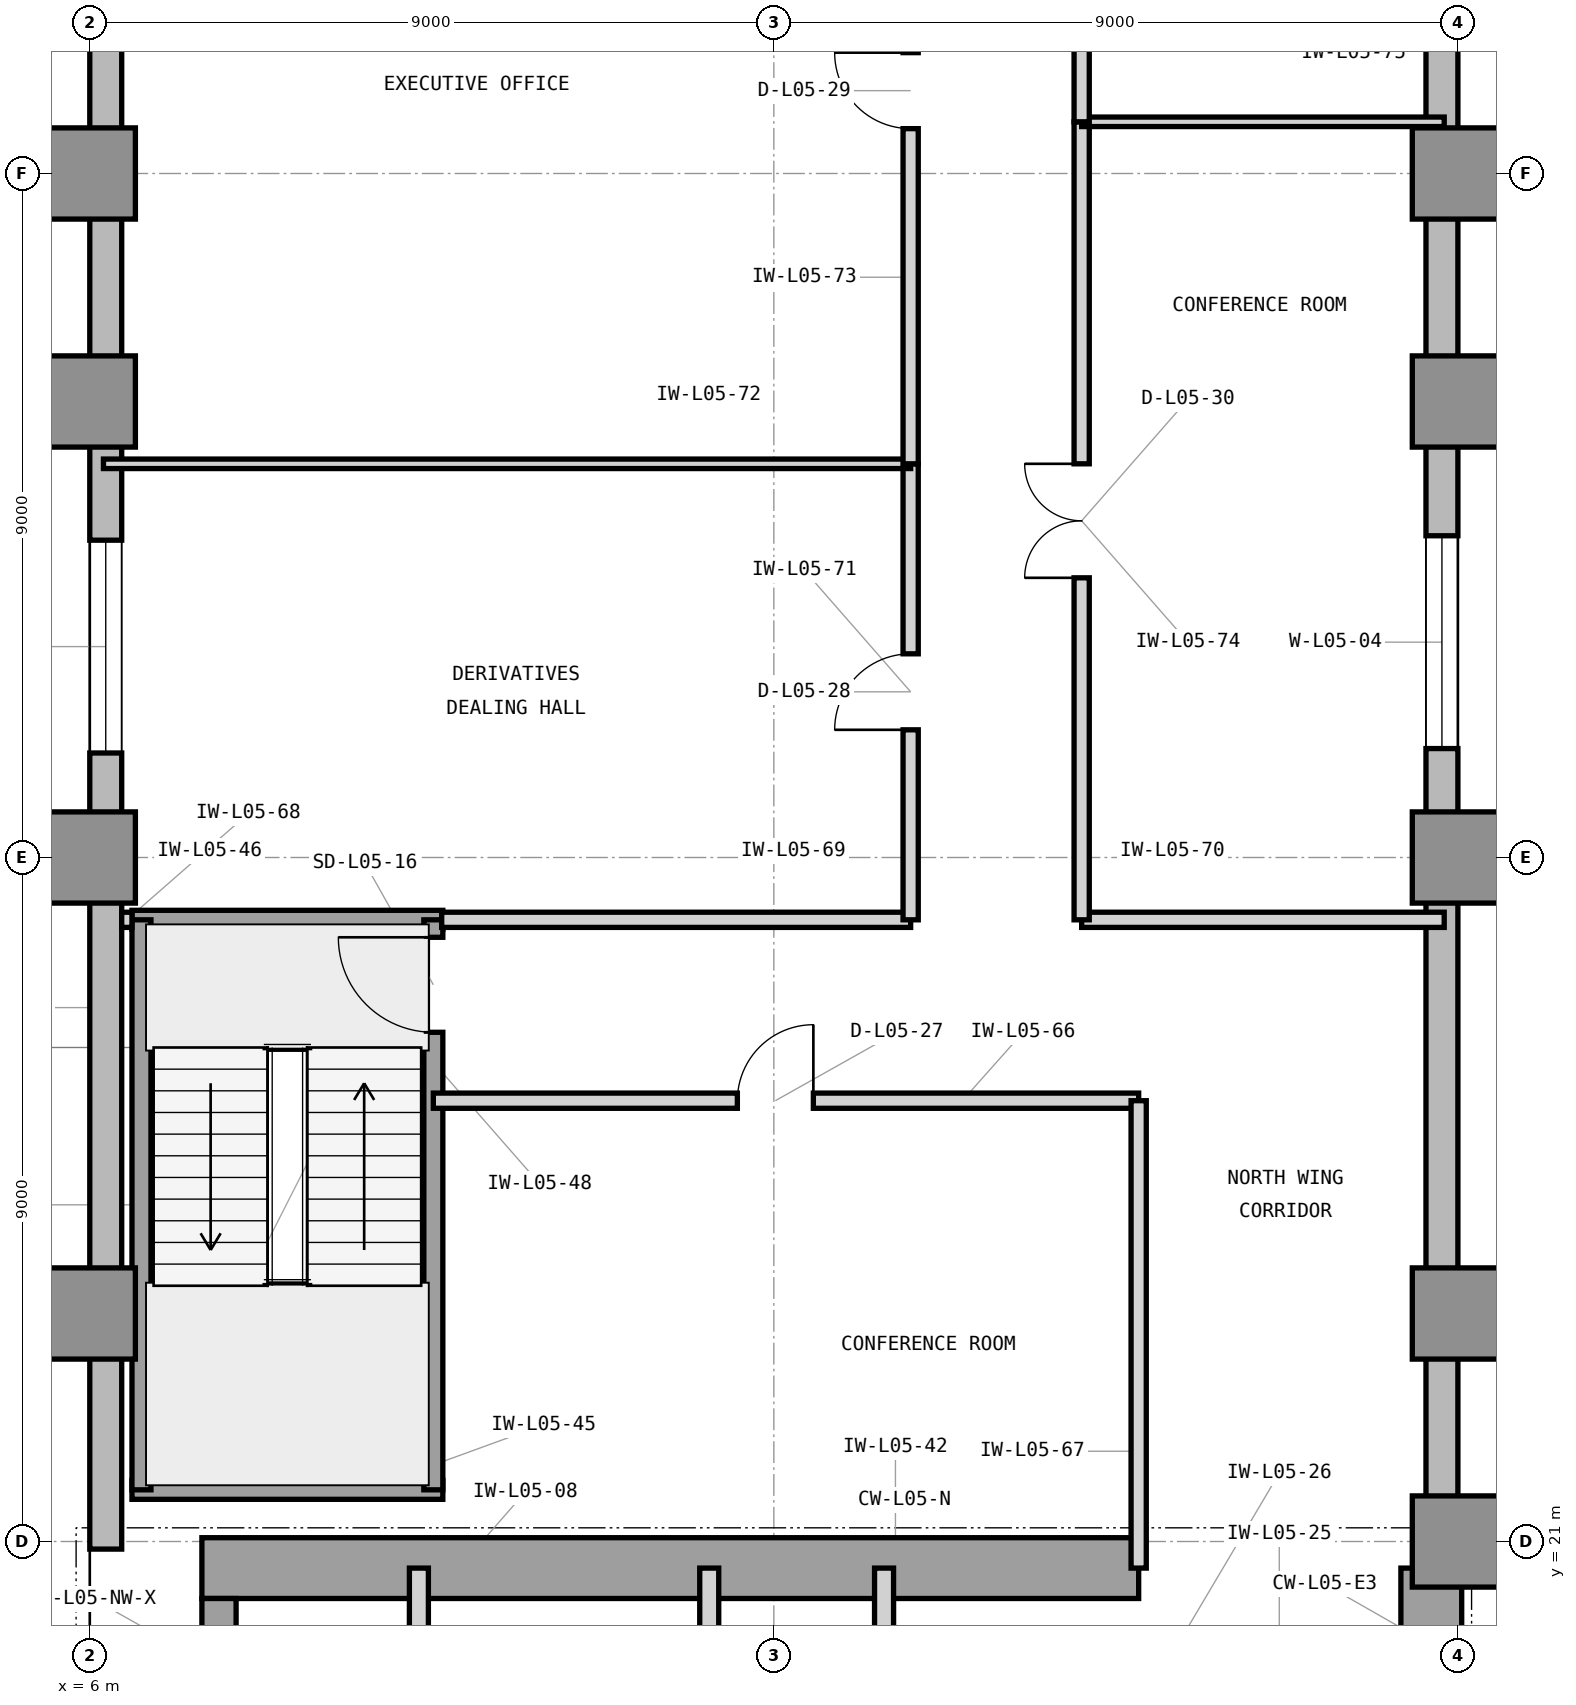
"""IFC4 building model, lengths in metres.
Left out: names, types, materials, properties, quantities, classifications, styles, units other than length and angle.
Written with IfcOpenShell. Run it as: python <this file> out.ifc"""

import sys

from ifc_helpers import new_model, si_unit, direction, frame, frame_2d, origin, origin_2d, place, context, subcontext, project, spatial, rectangle, extrude, element, fill, save


model = new_model("IFC4")
c1 = context("Model", 3, precision=1e-05, world=origin(), true_north=direction((0.0, 1.0)))
c2 = subcontext(c1, "Body", "Model", "MODEL_VIEW")
j1 = project(units=[si_unit("LENGTHUNIT", "METRE"), si_unit("PLANEANGLEUNIT", "RADIAN")], contexts=[c1])
p1 = place(None, origin())
s1 = spatial("IfcSite", under=j1, at=p1, CompositionType="ELEMENT")
p2 = place(p1, origin())
s2 = spatial("IfcBuilding", under=s1, at=p2, CompositionType="ELEMENT")
p3 = place(p2, frame((0.0, 0.0, 25.8)))
s3 = spatial("IfcBuildingStorey", under=s2, at=p3, CompositionType="ELEMENT", Elevation=25.8)
p4 = place(p3, frame((7.475, 20.65, 0.0), z_axis=(0.0, 0.0, 1.0), x_axis=(1.0, 0.0, 0.0)))
e1 = element("IfcWall", 1, at=p4, inside=s3, PredefinedType="SHEAR", context=c2, shape_type="SweptSolid", body=[
    extrude(rectangle(XDim=12.325, YDim=0.8, at=frame_2d((6.163, 0.0))), origin(), (0.0, 0.0, 1.0), 4.2),
])
p5 = place(p3, frame((23.65, 16.6, 0.0), z_axis=(0.0, 0.0, 1.0), x_axis=(0.0, 1.0, 0.0)))
e2 = element("IfcWall", 2, at=p5, inside=s3, PredefinedType="SHEAR", context=c2, shape_type="SweptSolid", body=[
    extrude(rectangle(XDim=4.05, YDim=0.8, at=frame_2d((2.025, 0.0))), origin(), (0.0, 0.0, 1.0), 4.2),
])
p6 = place(p3, frame((7.7, 19.575, 0.0), z_axis=(0.0, 0.0, 1.0), x_axis=(0.0, 1.0, 0.0)))
e3 = element("IfcWall", 3, at=p6, inside=s3, PredefinedType="SHEAR", context=c2, shape_type="SweptSolid", body=[
    extrude(rectangle(XDim=0.675, YDim=0.45, at=frame_2d((0.337, 0.0))), origin(), (0.0, 0.0, 1.0), 4.2),
])
for number, where, z_axis, x_axis in (
    (4, (24.0, 21.0, 0.0), (0.0, 0.0, 1.0), (1.0, 0.0, 0.0)),
    (5, (6.0, 24.0, 0.0), (0.0, 0.0, 1.0), (1.0, 0.0, 0.0)),
    (6, (24.0, 24.0, 0.0), (0.0, 0.0, 1.0), (1.0, 0.0, 0.0)),
    (7, (6.0, 30.0, 0.0), (0.0, 0.0, 1.0), (1.0, 0.0, 0.0)),
    (8, (24.0, 30.0, 0.0), (0.0, 0.0, 1.0), (1.0, 0.0, 0.0)),
    (9, (6.0, 36.0, 0.0), (0.0, 0.0, 1.0), (1.0, 0.0, 0.0)),
    (10, (24.0, 36.0, 0.0), (0.0, 0.0, 1.0), (1.0, 0.0, 0.0)),
    (11, (6.0, 39.0, 0.0), (0.0, 0.0, 1.0), (1.0, 0.0, 0.0)),
    (12, (24.0, 39.0, 0.0), (0.0, 0.0, 1.0), (1.0, 0.0, 0.0)),
):
    element("IfcColumn", number, at=place(p3, frame(where, z_axis=z_axis, x_axis=x_axis)), inside=s3, PredefinedType="COLUMN", context=c2, shape_type="SweptSolid", body=[
        extrude(rectangle(XDim=1.2, YDim=1.2, at=origin_2d()), origin(), (0.0, 0.0, 1.0), 4.2),
    ])
p7 = place(p3, frame((23.79, 21.0, 0.0), z_axis=(0.0, 0.0, 1.0), x_axis=(0.0, 1.0, 0.0)))
e13 = element("IfcWall", 13, at=p7, inside=s3, PredefinedType="STANDARD", context=c2, shape_type="SweptSolid", body=[
    extrude(rectangle(XDim=28.4, YDim=0.42, at=frame_2d((14.2, 0.0))), origin(), (0.0, 0.0, 1.0), 3.98),
])
p8 = place(p7, frame((10.433, 0.0, 0.85)))
e14 = element("IfcOpeningElement", 14, at=p8, cuts=e13, PredefinedType="OPENING", context=c2, shape_type="SweptSolid", body=[
    extrude(rectangle(XDim=2.8, YDim=2.45, at=frame_2d((1.4, 1.225))), frame((0.0, 0.22, 0.0), z_axis=(0.0, -1.0, 0.0), x_axis=(1.0, 0.0, 0.0)), (0.0, 0.0, 1.0), 0.44),
])
p9 = place(p7, frame((21.966, 0.0, 0.85)))
e15 = element("IfcOpeningElement", 15, at=p9, cuts=e13, PredefinedType="OPENING", context=c2, shape_type="SweptSolid", body=[
    extrude(rectangle(XDim=1.2, YDim=2.45, at=frame_2d((0.6, 1.225))), frame((0.0, 0.22, 0.0), z_axis=(0.0, -1.0, 0.0), x_axis=(1.0, 0.0, 0.0)), (0.0, 0.0, 1.0), 0.44),
])
p10 = place(p3, frame((6.21, 49.4, 0.0), z_axis=(0.0, 0.0, 1.0), x_axis=(0.0, -1.0, 0.0)))
e16 = element("IfcWall", 16, at=p10, inside=s3, PredefinedType="STANDARD", context=c2, shape_type="SweptSolid", body=[
    extrude(rectangle(XDim=28.5, YDim=0.42, at=frame_2d((14.25, 0.0))), origin(), (0.0, 0.0, 1.0), 3.98),
])
p11 = place(p10, frame((15.225, 0.0, 0.85)))
e17 = element("IfcOpeningElement", 17, at=p11, cuts=e16, PredefinedType="OPENING", context=c2, shape_type="SweptSolid", body=[
    extrude(rectangle(XDim=2.8, YDim=2.45, at=frame_2d((1.4, 1.225))), frame((0.0, 0.22, 0.0), z_axis=(0.0, -1.0, 0.0), x_axis=(1.0, 0.0, 0.0)), (0.0, 0.0, 1.0), 0.44),
])
p12 = place(p10, frame((5.236, 0.0, 0.85)))
e18 = element("IfcOpeningElement", 18, at=p12, cuts=e16, PredefinedType="OPENING", context=c2, shape_type="SweptSolid", body=[
    extrude(rectangle(XDim=1.2, YDim=2.45, at=frame_2d((0.6, 1.225))), frame((0.0, 0.22, 0.0), z_axis=(0.0, -1.0, 0.0), x_axis=(1.0, 0.0, 0.0)), (0.0, 0.0, 1.0), 0.44),
])
p13 = place(p3, frame((10.33, 19.45, 0.0), z_axis=(0.0, 0.0, 1.0), x_axis=(0.0, 1.0, 0.0)))
e19 = element("IfcWall", 19, at=p13, inside=s3, PredefinedType="PARTITIONING", context=c2, shape_type="SweptSolid", body=[
    extrude(rectangle(XDim=1.2, YDim=0.25, at=frame_2d((0.6, 0.0))), origin(), (0.0, 0.0, 1.0), 3.114),
])
for number, where, z_axis, x_axis in (
    (20, (14.15, 16.7, 0.0), (0.0, 0.0, 1.0), (0.0, 1.0, 0.0)),
    (21, (16.45, 16.7, 0.0), (0.0, 0.0, 1.0), (0.0, 1.0, 0.0)),
):
    element("IfcWall", number, at=place(p3, frame(where, z_axis=z_axis, x_axis=x_axis)), inside=s3, PredefinedType="PARTITIONING", context=c2, shape_type="SweptSolid", body=[
        extrude(rectangle(XDim=3.95, YDim=0.25, at=frame_2d((1.975, 0.0))), origin(), (0.0, 0.0, 1.0), 3.97),
    ])
for number, where, z_axis, x_axis in (
    (22, (6.555, 21.68, 0.0), (0.0, 0.0, 1.0), (1.0, 0.0, 0.0)),
    (23, (6.555, 29.18, 0.0), (0.0, 0.0, 1.0), (1.0, 0.0, 0.0)),
):
    element("IfcWall", number, at=place(p3, frame(where, z_axis=z_axis, x_axis=x_axis)), inside=s3, PredefinedType="SHEAR", context=c2, shape_type="SweptSolid", body=[
        extrude(rectangle(XDim=4.09, YDim=0.25, at=frame_2d((2.045, 0.0))), origin(), (0.0, 0.0, 1.0), 4.2),
    ])
p14 = place(p3, frame((6.68, 21.68, 0.0), z_axis=(0.0, 0.0, 1.0), x_axis=(0.0, 1.0, 0.0)))
e24 = element("IfcWall", 24, at=p14, inside=s3, PredefinedType="SHEAR", context=c2, shape_type="SweptSolid", body=[
    extrude(rectangle(XDim=7.5, YDim=0.25, at=frame_2d((3.75, 0.0))), origin(), (0.0, 0.0, 1.0), 4.2),
])
p15 = place(p3, frame((10.52, 21.68, 0.0), z_axis=(0.0, 0.0, 1.0), x_axis=(0.0, 1.0, 0.0)))
e25 = element("IfcWall", 25, at=p15, inside=s3, PredefinedType="SHEAR", context=c2, shape_type="SweptSolid", body=[
    extrude(rectangle(XDim=7.5, YDim=0.25, at=frame_2d((3.75, 0.0))), origin(), (0.0, 0.0, 1.0), 4.2),
])
p16 = place(p15, frame((6.02, 0.0, 0.0)))
e26 = element("IfcOpeningElement", 26, at=p16, cuts=e25, PredefinedType="OPENING", context=c2, shape_type="SweptSolid", body=[
    extrude(rectangle(XDim=1.25, YDim=2.2, at=frame_2d((0.625, 1.1))), frame((0.0, 0.135, 0.0), z_axis=(0.0, -1.0, 0.0), x_axis=(1.0, 0.0, 0.0)), (0.0, 0.0, 1.0), 0.27),
])
p17 = place(p3, frame((10.52, 26.8, 0.0), z_axis=(0.0, 0.0, 1.0), x_axis=(1.0, 0.0, 0.0)))
e27 = element("IfcWall", 27, at=p17, inside=s3, PredefinedType="PARTITIONING", context=c2, shape_type="SweptSolid", body=[
    extrude(rectangle(XDim=9.28, YDim=0.2, at=frame_2d((4.64, 0.0))), origin(), (0.0, 0.0, 1.0), 3.97),
])
p18 = place(p17, frame((4.0, 0.0, 0.0)))
e28 = element("IfcOpeningElement", 28, at=p18, cuts=e27, PredefinedType="OPENING", context=c2, shape_type="SweptSolid", body=[
    extrude(rectangle(XDim=1.0, YDim=2.15, at=frame_2d((0.5, 1.075))), frame((0.0, 0.11, 0.0), z_axis=(0.0, -1.0, 0.0), x_axis=(1.0, 0.0, 0.0)), (0.0, 0.0, 1.0), 0.22),
])
p19 = place(p3, frame((19.8, 20.65, 0.0), z_axis=(0.0, 0.0, 1.0), x_axis=(0.0, 1.0, 0.0)))
e29 = element("IfcWall", 29, at=p19, inside=s3, PredefinedType="PARTITIONING", context=c2, shape_type="SweptSolid", body=[
    extrude(rectangle(XDim=6.15, YDim=0.2, at=frame_2d((3.075, 0.0))), origin(), (0.0, 0.0, 1.0), 3.97),
])
p20 = place(p3, frame((6.42, 29.18, 0.0), z_axis=(0.0, 0.0, 1.0), x_axis=(1.0, 0.0, 0.0)))
e30 = element("IfcWall", 30, at=p20, inside=s3, PredefinedType="PARTITIONING", context=c2, shape_type="SweptSolid", body=[
    extrude(rectangle(XDim=0.135, YDim=0.2, at=frame_2d((0.067, 0.0))), origin(), (0.0, 0.0, 1.0), 3.97),
])
p21 = place(p3, frame((10.63, 29.18, 0.0), z_axis=(0.0, 0.0, 1.0), x_axis=(1.0, 0.0, 0.0)))
e31 = element("IfcWall", 31, at=p21, inside=s3, PredefinedType="PARTITIONING", context=c2, shape_type="SweptSolid", body=[
    extrude(rectangle(XDim=6.17, YDim=0.2, at=frame_2d((3.085, 0.0))), origin(), (0.0, 0.0, 1.0), 3.97),
])
p22 = place(p3, frame((19.05, 29.18, 0.0), z_axis=(0.0, 0.0, 1.0), x_axis=(1.0, 0.0, 0.0)))
e32 = element("IfcWall", 32, at=p22, inside=s3, PredefinedType="PARTITIONING", context=c2, shape_type="SweptSolid", body=[
    extrude(rectangle(XDim=4.77, YDim=0.2, at=frame_2d((2.385, 0.0))), origin(), (0.0, 0.0, 1.0), 3.97),
])
p23 = place(p3, frame((16.8, 29.18, 0.0), z_axis=(0.0, 0.0, 1.0), x_axis=(0.0, 1.0, 0.0)))
e33 = element("IfcWall", 33, at=p23, inside=s3, PredefinedType="PARTITIONING", context=c2, shape_type="SweptSolid", body=[
    extrude(rectangle(XDim=6.0, YDim=0.2, at=frame_2d((3.0, 0.0))), origin(), (0.0, 0.0, 1.0), 3.97),
])
p24 = place(p23, frame((2.5, 0.0, 0.0)))
e34 = element("IfcOpeningElement", 34, at=p24, cuts=e33, PredefinedType="OPENING", context=c2, shape_type="SweptSolid", body=[
    extrude(rectangle(XDim=1.0, YDim=2.15, at=frame_2d((0.5, 1.075))), frame((0.0, 0.11, 0.0), z_axis=(0.0, -1.0, 0.0), x_axis=(1.0, 0.0, 0.0)), (0.0, 0.0, 1.0), 0.22),
])
p25 = place(p3, frame((6.18, 35.18, 0.0), z_axis=(0.0, 0.0, 1.0), x_axis=(1.0, 0.0, 0.0)))
e35 = element("IfcWall", 35, at=p25, inside=s3, PredefinedType="PARTITIONING", context=c2, shape_type="SweptSolid", body=[
    extrude(rectangle(XDim=10.62, YDim=0.125, at=frame_2d((5.31, 0.0))), origin(), (0.0, 0.0, 1.0), 3.97),
])
p26 = place(p3, frame((16.8, 35.18, 0.0), z_axis=(0.0, 0.0, 1.0), x_axis=(0.0, 1.0, 0.0)))
e36 = element("IfcWall", 36, at=p26, inside=s3, PredefinedType="PARTITIONING", context=c2, shape_type="SweptSolid", body=[
    extrude(rectangle(XDim=9.82, YDim=0.2, at=frame_2d((4.91, 0.0))), origin(), (0.0, 0.0, 1.0), 3.97),
])
p27 = place(p26, frame((4.41, 0.0, 0.0)))
e37 = element("IfcOpeningElement", 37, at=p27, cuts=e36, PredefinedType="OPENING", context=c2, shape_type="SweptSolid", body=[
    extrude(rectangle(XDim=1.0, YDim=2.15, at=frame_2d((0.5, 1.075))), frame((0.0, 0.11, 0.0), z_axis=(0.0, -1.0, 0.0), x_axis=(1.0, 0.0, 0.0)), (0.0, 0.0, 1.0), 0.22),
])
p28 = place(p3, frame((19.05, 29.18, 0.0), z_axis=(0.0, 0.0, 1.0), x_axis=(0.0, 1.0, 0.0)))
e38 = element("IfcWall", 38, at=p28, inside=s3, PredefinedType="PARTITIONING", context=c2, shape_type="SweptSolid", body=[
    extrude(rectangle(XDim=10.5, YDim=0.2, at=frame_2d((5.25, 0.0))), origin(), (0.0, 0.0, 1.0), 3.97),
])
p29 = place(p28, frame((4.5, 0.0, 0.0)))
e39 = element("IfcOpeningElement", 39, at=p29, cuts=e38, PredefinedType="OPENING", context=c2, shape_type="SweptSolid", body=[
    extrude(rectangle(XDim=1.5, YDim=2.3, at=frame_2d((0.75, 1.15))), frame((0.0, 0.11, 0.0), z_axis=(0.0, -1.0, 0.0), x_axis=(1.0, 0.0, 0.0)), (0.0, 0.0, 1.0), 0.22),
])
p30 = place(p3, frame((19.05, 39.68, 0.0), z_axis=(0.0, 0.0, 1.0), x_axis=(1.0, 0.0, 0.0)))
e40 = element("IfcWall", 40, at=p30, inside=s3, PredefinedType="PARTITIONING", context=c2, shape_type="SweptSolid", body=[
    extrude(rectangle(XDim=4.77, YDim=0.125, at=frame_2d((2.385, 0.0))), origin(), (0.0, 0.0, 1.0), 3.97),
])
p31 = place(p3, frame((19.05, 39.68, 0.0), z_axis=(0.0, 0.0, 1.0), x_axis=(0.0, 1.0, 0.0)))
e41 = element("IfcWall", 41, at=p31, inside=s3, PredefinedType="PARTITIONING", context=c2, shape_type="SweptSolid", body=[
    extrude(rectangle(XDim=5.32, YDim=0.2, at=frame_2d((2.66, 0.0))), origin(), (0.0, 0.0, 1.0), 3.97),
])
p32 = place(p31, frame((2.16, 0.0, 0.0)))
e42 = element("IfcOpeningElement", 42, at=p32, cuts=e41, PredefinedType="OPENING", context=c2, shape_type="SweptSolid", body=[
    extrude(rectangle(XDim=1.0, YDim=2.15, at=frame_2d((0.5, 1.075))), frame((0.0, 0.11, 0.0), z_axis=(0.0, -1.0, 0.0), x_axis=(1.0, 0.0, 0.0)), (0.0, 0.0, 1.0), 0.22),
])
p33 = place(p8, origin())
e43 = element("IfcWindow", 43, at=p33, inside=s3, PartitioningType="SINGLE_PANEL", PredefinedType="WINDOW", context=c2, shape_type="SweptSolid", body=[
    extrude(rectangle(XDim=2.8, YDim=2.45, at=frame_2d((1.4, 1.225))), frame((0.0, 0.11, 0.0), z_axis=(0.0, -1.0, 0.0), x_axis=(1.0, 0.0, 0.0)), (0.0, 0.0, 1.0), 0.06),
])
fill(e14, e43)
p34 = place(p11, origin())
e44 = element("IfcWindow", 44, at=p34, inside=s3, PartitioningType="SINGLE_PANEL", PredefinedType="WINDOW", context=c2, shape_type="SweptSolid", body=[
    extrude(rectangle(XDim=2.8, YDim=2.45, at=frame_2d((1.4, 1.225))), frame((0.0, 0.11, 0.0), z_axis=(0.0, -1.0, 0.0), x_axis=(1.0, 0.0, 0.0)), (0.0, 0.0, 1.0), 0.06),
])
fill(e17, e44)
p35 = place(p16, origin())
e45 = element("IfcDoor", 45, at=p35, inside=s3, OperationType="SINGLE_SWING_RIGHT", PredefinedType="DOOR", context=c2, shape_type="SweptSolid", body=[
    extrude(rectangle(XDim=1.25, YDim=2.2, at=frame_2d((0.625, 1.1))), frame((0.0, 0.025, 0.0), z_axis=(0.0, -1.0, 0.0), x_axis=(1.0, 0.0, 0.0)), (0.0, 0.0, 1.0), 0.05),
])
fill(e26, e45)
p36 = place(p18, origin())
e46 = element("IfcDoor", 46, at=p36, inside=s3, OperationType="SINGLE_SWING_RIGHT", PredefinedType="DOOR", context=c2, shape_type="SweptSolid", body=[
    extrude(rectangle(XDim=1.0, YDim=2.15, at=frame_2d((0.5, 1.075))), frame((0.0, 0.025, 0.0), z_axis=(0.0, -1.0, 0.0), x_axis=(1.0, 0.0, 0.0)), (0.0, 0.0, 1.0), 0.05),
])
fill(e28, e46)
p37 = place(p24, origin())
e47 = element("IfcDoor", 47, at=p37, inside=s3, OperationType="SINGLE_SWING_LEFT", PredefinedType="DOOR", context=c2, shape_type="SweptSolid", body=[
    extrude(rectangle(XDim=1.0, YDim=2.15, at=frame_2d((0.5, 1.075))), frame((0.0, 0.025, 0.0), z_axis=(0.0, -1.0, 0.0), x_axis=(1.0, 0.0, 0.0)), (0.0, 0.0, 1.0), 0.05),
])
fill(e34, e47)
p38 = place(p27, origin())
e48 = element("IfcDoor", 48, at=p38, inside=s3, OperationType="SINGLE_SWING_RIGHT", PredefinedType="DOOR", context=c2, shape_type="SweptSolid", body=[
    extrude(rectangle(XDim=1.0, YDim=2.15, at=frame_2d((0.5, 1.075))), frame((0.0, 0.025, 0.0), z_axis=(0.0, -1.0, 0.0), x_axis=(1.0, 0.0, 0.0)), (0.0, 0.0, 1.0), 0.05),
])
fill(e37, e48)
p39 = place(p29, origin())
e49 = element("IfcDoor", 49, at=p39, inside=s3, OperationType="DOUBLE_DOOR_SINGLE_SWING", PredefinedType="DOOR", context=c2, shape_type="SweptSolid", body=[
    extrude(rectangle(XDim=1.5, YDim=2.3, at=frame_2d((0.75, 1.15))), frame((0.0, 0.025, 0.0), z_axis=(0.0, -1.0, 0.0), x_axis=(1.0, 0.0, 0.0)), (0.0, 0.0, 1.0), 0.05),
])
fill(e39, e49)
save(model, sys.argv[1])
